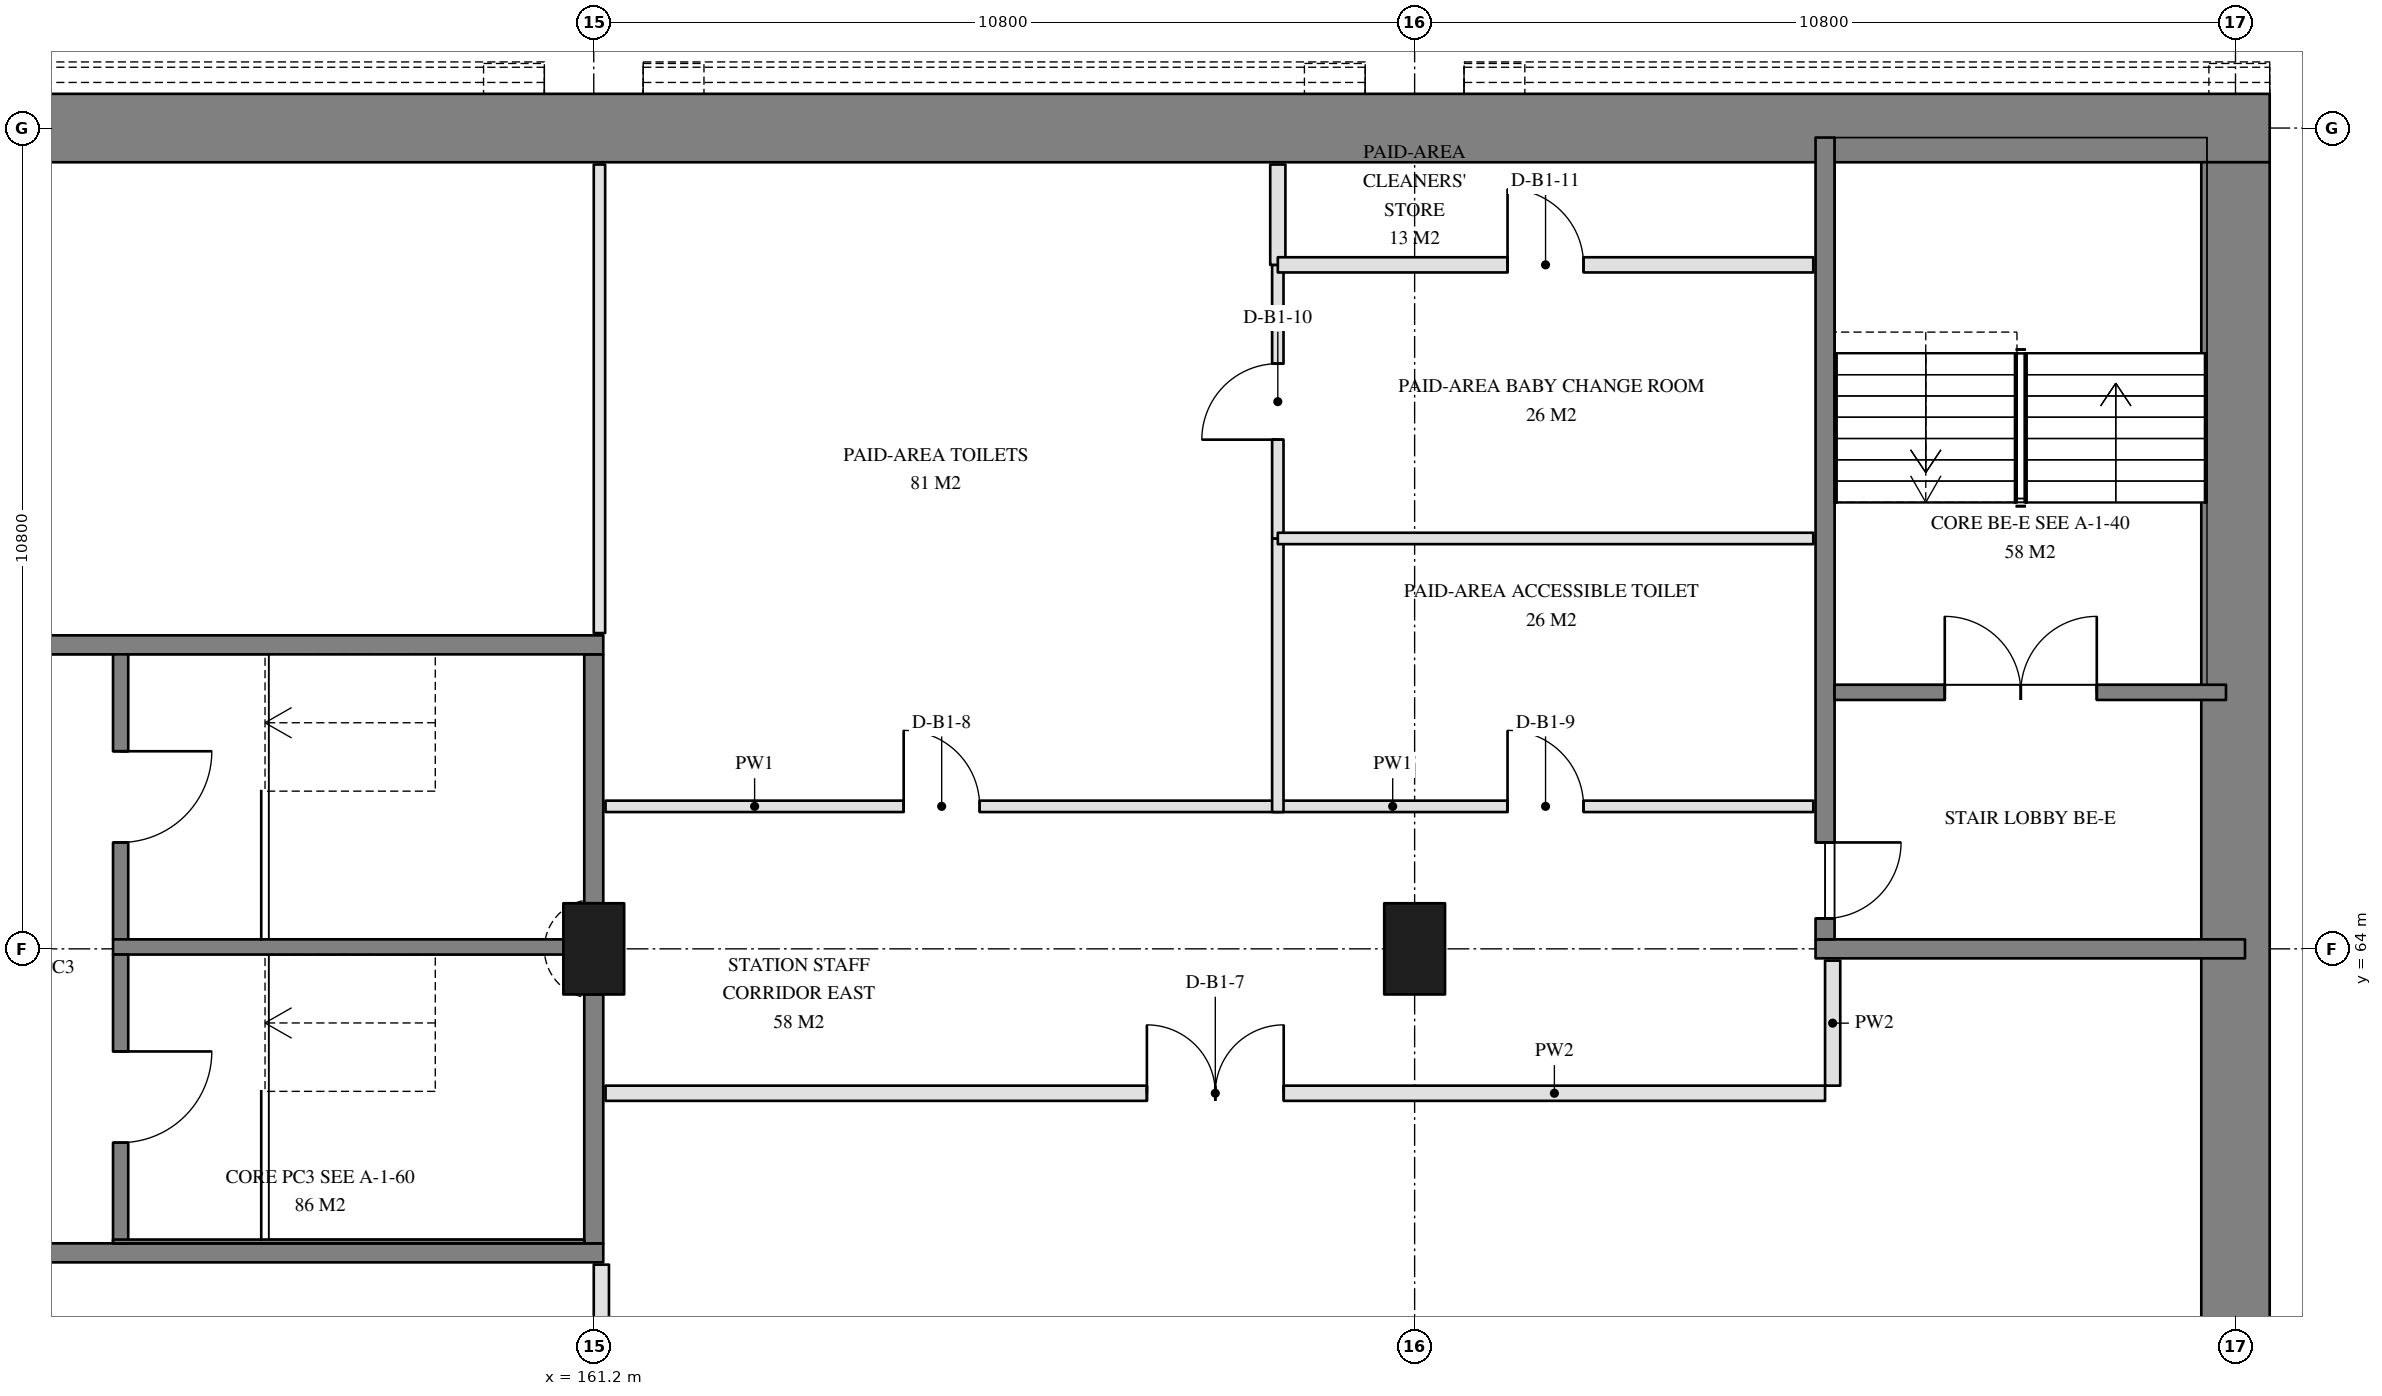
"""IFC4 building model, lengths in metres.
Left out: names, types, materials, properties, quantities, classifications, styles, units other than length and angle.
Written with IfcOpenShell. Run it as: python <this file> out.ifc"""

import sys

from ifc_helpers import new_model, si_unit, direction, frame, frame_2d, origin, origin_2d, place, context, subcontext, project, spatial, rectangle, extrude, element, fill, save


model = new_model("IFC4")
c1 = context("Model", 3, precision=1e-05, world=origin(), true_north=direction((0.0, 1.0)))
c2 = subcontext(c1, "Body", "Model", "MODEL_VIEW")
j1 = project(units=[si_unit("LENGTHUNIT", "METRE"), si_unit("PLANEANGLEUNIT", "RADIAN")], contexts=[c1])
p1 = place(None, origin())
s1 = spatial("IfcSite", under=j1, at=p1, CompositionType="ELEMENT")
p2 = place(p1, origin())
s2 = spatial("IfcBuilding", under=s1, at=p2, CompositionType="ELEMENT")
p3 = place(p2, frame((0.0, 0.0, -5.4)))
s3 = spatial("IfcBuildingStorey", under=s2, at=p3, CompositionType="ELEMENT", Elevation=-5.4)
for number, where, z_axis, x_axis in (
    (1, (161.2, 64.0, 0.0), (0.0, 0.0, 1.0), (1.0, 0.0, 0.0)),
    (2, (172.0, 64.0, 0.0), (0.0, 0.0, 1.0), (1.0, 0.0, 0.0)),
):
    element("IfcColumn", number, at=place(p3, frame(where, z_axis=z_axis, x_axis=x_axis)), inside=s3, PredefinedType="COLUMN", context=c2, shape_type="SweptSolid", body=[
        extrude(rectangle(XDim=0.8, YDim=1.2, at=origin_2d()), origin(), (0.0, 0.0, 1.0), 5.4),
    ])
p4 = place(p3, frame((183.25, 74.8, 0.0), z_axis=(0.0, 0.0, 1.0), x_axis=(-1.0, 0.0, 0.0)))
e3 = element("IfcWall", 3, at=p4, inside=s3, PredefinedType="SOLIDWALL", context=c2, shape_type="SweptSolid", body=[
    extrude(rectangle(XDim=64.85, YDim=0.9, at=frame_2d((32.425, 0.0))), origin(), (0.0, 0.0, 1.0), 4.8),
])
p5 = place(p3, frame((182.8, 53.7, 0.0), z_axis=(0.0, 0.0, 1.0), x_axis=(0.0, 1.0, 0.0)))
e4 = element("IfcWall", 4, at=p5, inside=s3, PredefinedType="SOLIDWALL", context=c2, shape_type="SweptSolid", body=[
    extrude(rectangle(XDim=20.65, YDim=0.9, at=frame_2d((10.325, 0.0))), origin(), (0.0, 0.0, 1.0), 4.8),
])
p6 = place(p3, frame((150.275, 60.0, 0.0), z_axis=(0.0, 0.0, 1.0), x_axis=(1.0, 0.0, 0.0)))
e5 = element("IfcWall", 5, at=p6, inside=s3, PredefinedType="SOLIDWALL", context=c2, shape_type="SweptSolid", body=[
    extrude(rectangle(XDim=11.05, YDim=0.25, at=frame_2d((5.525, 0.0))), origin(), (0.0, 0.0, 1.0), 4.8),
])
p7 = place(p6, frame((1.525, 0.0, 0.0)))
e6 = element("IfcOpeningElement", 6, at=p7, cuts=e5, PredefinedType="OPENING", context=c2, shape_type="SweptSolid", body=[
    extrude(rectangle(XDim=1.8, YDim=2.1, at=frame_2d((0.9, 1.05))), frame((0.0, 0.135, 0.0), z_axis=(0.0, -1.0, 0.0), x_axis=(1.0, 0.0, 0.0)), (0.0, 0.0, 1.0), 0.27),
])
for number, where, z_axis, x_axis in (
    (7, (161.2, 60.125, 0.0), (0.0, 0.0, 1.0), (0.0, 1.0, 0.0)),
    (8, (161.2, 64.6, 0.0), (0.0, 0.0, 1.0), (0.0, 1.0, 0.0)),
):
    element("IfcWall", number, at=place(p3, frame(where, z_axis=z_axis, x_axis=x_axis)), inside=s3, PredefinedType="SOLIDWALL", context=c2, shape_type="SweptSolid", body=[
        extrude(rectangle(XDim=3.275, YDim=0.25, at=frame_2d((1.637, 0.0))), origin(), (0.0, 0.0, 1.0), 4.8),
    ])
p8 = place(p3, frame((161.325, 68.0, 0.0), z_axis=(0.0, 0.0, 1.0), x_axis=(-1.0, 0.0, 0.0)))
e9 = element("IfcWall", 9, at=p8, inside=s3, PredefinedType="SOLIDWALL", context=c2, shape_type="SweptSolid", body=[
    extrude(rectangle(XDim=11.05, YDim=0.25, at=frame_2d((5.525, 0.0))), origin(), (0.0, 0.0, 1.0), 4.8),
])
p9 = place(p3, frame((177.275, 64.0, 0.0), z_axis=(0.0, 0.0, 1.0), x_axis=(1.0, 0.0, 0.0)))
e10 = element("IfcWall", 10, at=p9, inside=s3, PredefinedType="SOLIDWALL", context=c2, shape_type="SweptSolid", body=[
    extrude(rectangle(XDim=5.65, YDim=0.25, at=frame_2d((2.825, 0.0))), origin(), (0.0, 0.0, 1.0), 5.4),
])
p10 = place(p3, frame((177.4, 74.675, 0.0), z_axis=(0.0, 0.0, 1.0), x_axis=(0.0, -1.0, 0.0)))
e11 = element("IfcWall", 11, at=p10, inside=s3, PredefinedType="SOLIDWALL", context=c2, shape_type="SweptSolid", body=[
    extrude(rectangle(XDim=10.55, YDim=0.25, at=frame_2d((5.275, 0.0))), origin(), (0.0, 0.0, 1.0), 5.4),
])
p11 = place(p10, frame((9.275, 0.0, 0.0)))
e12 = element("IfcOpeningElement", 12, at=p11, cuts=e11, PredefinedType="OPENING", context=c2, shape_type="SweptSolid", body=[
    extrude(rectangle(XDim=1.0, YDim=2.1, at=frame_2d((0.5, 1.05))), frame((0.0, 0.135, 0.0), z_axis=(0.0, -1.0, 0.0), x_axis=(1.0, 0.0, 0.0)), (0.0, 0.0, 1.0), 0.27),
])
p12 = place(p3, frame((154.975, 67.875, 0.0), z_axis=(0.0, 0.0, 1.0), x_axis=(0.0, -1.0, 0.0)))
e13 = element("IfcWall", 13, at=p12, inside=s3, PredefinedType="SOLIDWALL", context=c2, shape_type="SweptSolid", body=[
    extrude(rectangle(XDim=3.75, YDim=0.2, at=frame_2d((1.875, 0.0))), origin(), (0.0, 0.0, 1.0), 3.6),
])
p13 = place(p12, frame((1.275, 0.0, 0.0)))
e14 = element("IfcOpeningElement", 14, at=p13, cuts=e13, PredefinedType="OPENING", context=c2, shape_type="SweptSolid", body=[
    extrude(rectangle(XDim=1.2, YDim=2.1, at=frame_2d((0.6, 1.05))), frame((0.0, 0.11, 0.0), z_axis=(0.0, -1.0, 0.0), x_axis=(1.0, 0.0, 0.0)), (0.0, 0.0, 1.0), 0.22),
])
p14 = place(p3, frame((154.875, 64.025, 0.0), z_axis=(0.0, 0.0, 1.0), x_axis=(1.0, 0.0, 0.0)))
e15 = element("IfcWall", 15, at=p14, inside=s3, PredefinedType="SOLIDWALL", context=c2, shape_type="SweptSolid", body=[
    extrude(rectangle(XDim=6.2, YDim=0.2, at=frame_2d((3.1, 0.0))), origin(), (0.0, 0.0, 1.0), 3.6),
])
p15 = place(p3, frame((154.975, 63.925, 0.0), z_axis=(0.0, 0.0, 1.0), x_axis=(0.0, -1.0, 0.0)))
e16 = element("IfcWall", 16, at=p15, inside=s3, PredefinedType="SOLIDWALL", context=c2, shape_type="SweptSolid", body=[
    extrude(rectangle(XDim=3.8, YDim=0.2, at=frame_2d((1.9, 0.0))), origin(), (0.0, 0.0, 1.0), 3.6),
])
p16 = place(p15, frame((1.275, 0.0, 0.0)))
e17 = element("IfcOpeningElement", 17, at=p16, cuts=e16, PredefinedType="OPENING", context=c2, shape_type="SweptSolid", body=[
    extrude(rectangle(XDim=1.2, YDim=2.1, at=frame_2d((0.6, 1.05))), frame((0.0, 0.11, 0.0), z_axis=(0.0, -1.0, 0.0), x_axis=(1.0, 0.0, 0.0)), (0.0, 0.0, 1.0), 0.22),
])
p17 = place(p3, frame((154.875, 60.15, 0.0), z_axis=(0.0, 0.0, 1.0), x_axis=(1.0, 0.0, 0.0)))
e18 = element("IfcWall", 18, at=p17, inside=s3, PredefinedType="SOLIDWALL", context=c2, shape_type="SweptSolid", body=[
    extrude(rectangle(XDim=6.2, YDim=0.05, at=frame_2d((3.1, 0.0))), origin(), (0.0, 0.0, 1.0), 3.6),
])
p18 = place(p3, frame((177.525, 67.375, 0.0), z_axis=(0.0, 0.0, 1.0), x_axis=(1.0, 0.0, 0.0)))
e19 = element("IfcWall", 19, at=p18, inside=s3, PredefinedType="SOLIDWALL", context=c2, shape_type="SweptSolid", body=[
    extrude(rectangle(XDim=5.15, YDim=0.2, at=frame_2d((2.575, 0.0))), origin(), (0.0, 0.0, 1.0), 4.8),
])
p19 = place(p18, frame((1.45, 0.0, 0.0)))
e20 = element("IfcOpeningElement", 20, at=p19, cuts=e19, PredefinedType="OPENING", context=c2, shape_type="SweptSolid", body=[
    extrude(rectangle(XDim=2.0, YDim=2.1, at=frame_2d((1.0, 1.05))), frame((0.0, 0.11, 0.0), z_axis=(0.0, -1.0, 0.0), x_axis=(1.0, 0.0, 0.0)), (0.0, 0.0, 1.0), 0.22),
])
p20 = place(p3, frame((177.5, 62.2, 0.0), z_axis=(0.0, 0.0, 1.0), x_axis=(0.0, 1.0, 0.0)))
e21 = element("IfcWall", 21, at=p20, inside=s3, PredefinedType="PARTITIONING", context=c2, shape_type="SweptSolid", body=[
    extrude(rectangle(XDim=1.645, YDim=0.2, at=frame_2d((0.823, 0.0))), origin(), (0.0, 0.0, 1.0), 4.8),
])
p21 = place(p3, frame((161.355, 62.1, 0.0), z_axis=(0.0, 0.0, 1.0), x_axis=(1.0, 0.0, 0.0)))
e22 = element("IfcWall", 22, at=p21, inside=s3, PredefinedType="PARTITIONING", context=c2, shape_type="SweptSolid", body=[
    extrude(rectangle(XDim=16.045, YDim=0.2, at=frame_2d((8.022, 0.0))), origin(), (0.0, 0.0, 1.0), 3.6),
])
p22 = place(p21, frame((7.123, 0.0, 0.0)))
e23 = element("IfcOpeningElement", 23, at=p22, cuts=e22, PredefinedType="OPENING", context=c2, shape_type="SweptSolid", body=[
    extrude(rectangle(XDim=1.8, YDim=2.1, at=frame_2d((0.9, 1.05))), frame((0.0, 0.11, 0.0), z_axis=(0.0, -1.0, 0.0), x_axis=(1.0, 0.0, 0.0)), (0.0, 0.0, 1.0), 0.22),
])
p23 = place(p3, frame((170.2, 65.875, 0.0), z_axis=(0.0, 0.0, 1.0), x_axis=(1.0, 0.0, 0.0)))
e24 = element("IfcWall", 24, at=p23, inside=s3, PredefinedType="PARTITIONING", context=c2, shape_type="SweptSolid", body=[
    extrude(rectangle(XDim=7.045, YDim=0.15, at=frame_2d((3.522, 0.0))), origin(), (0.0, 0.0, 1.0), 3.6),
])
p24 = place(p23, frame((3.022, 0.0, 0.0)))
e25 = element("IfcOpeningElement", 25, at=p24, cuts=e24, PredefinedType="OPENING", context=c2, shape_type="SweptSolid", body=[
    extrude(rectangle(XDim=1.0, YDim=2.1, at=frame_2d((0.5, 1.05))), frame((0.0, 0.085, 0.0), z_axis=(0.0, -1.0, 0.0), x_axis=(1.0, 0.0, 0.0)), (0.0, 0.0, 1.0), 0.17),
])
p25 = place(p3, frame((161.355, 65.875, 0.0), z_axis=(0.0, 0.0, 1.0), x_axis=(1.0, 0.0, 0.0)))
e26 = element("IfcWall", 26, at=p25, inside=s3, PredefinedType="PARTITIONING", context=c2, shape_type="SweptSolid", body=[
    extrude(rectangle(XDim=8.845, YDim=0.15, at=frame_2d((4.422, 0.0))), origin(), (0.0, 0.0, 1.0), 3.6),
])
p26 = place(p25, frame((3.923, 0.0, 0.0)))
e27 = element("IfcOpeningElement", 27, at=p26, cuts=e26, PredefinedType="OPENING", context=c2, shape_type="SweptSolid", body=[
    extrude(rectangle(XDim=1.0, YDim=2.1, at=frame_2d((0.5, 1.05))), frame((0.0, 0.085, 0.0), z_axis=(0.0, -1.0, 0.0), x_axis=(1.0, 0.0, 0.0)), (0.0, 0.0, 1.0), 0.17),
])
p27 = place(p3, frame((161.3, 53.72, 0.0), z_axis=(0.0, 0.0, 1.0), x_axis=(0.0, 1.0, 0.0)))
e28 = element("IfcWall", 28, at=p27, inside=s3, PredefinedType="PARTITIONING", context=c2, shape_type="SweptSolid", body=[
    extrude(rectangle(XDim=6.125, YDim=0.2, at=frame_2d((3.062, 0.0))), origin(), (0.0, 0.0, 1.0), 3.6),
])
p28 = place(p3, frame((170.2, 65.8, 0.0), z_axis=(0.0, 0.0, 1.0), x_axis=(0.0, 1.0, 0.0)))
e29 = element("IfcWall", 29, at=p28, inside=s3, PredefinedType="PARTITIONING", context=c2, shape_type="SweptSolid", body=[
    extrude(rectangle(XDim=3.6, YDim=0.15, at=frame_2d((1.8, 0.0))), origin(), (0.0, 0.0, 1.0), 4.8),
])
p29 = place(p3, frame((161.275, 68.155, 0.0), z_axis=(0.0, 0.0, 1.0), x_axis=(0.0, 1.0, 0.0)))
e30 = element("IfcWall", 30, at=p29, inside=s3, PredefinedType="PARTITIONING", context=c2, shape_type="SweptSolid", body=[
    extrude(rectangle(XDim=6.165, YDim=0.15, at=frame_2d((3.083, 0.0))), origin(), (0.0, 0.0, 1.0), 3.6),
])
p30 = place(p3, frame((170.2, 69.4, 0.0), z_axis=(0.0, 0.0, 1.0), x_axis=(0.0, 1.0, 0.0)))
e31 = element("IfcWall", 31, at=p30, inside=s3, PredefinedType="PARTITIONING", context=c2, shape_type="SweptSolid", body=[
    extrude(rectangle(XDim=3.6, YDim=0.15, at=frame_2d((1.8, 0.0))), origin(), (0.0, 0.0, 1.0), 4.8),
])
p31 = place(p30, frame((1.3, 0.0, 0.0)))
e32 = element("IfcOpeningElement", 32, at=p31, cuts=e31, PredefinedType="OPENING", context=c2, shape_type="SweptSolid", body=[
    extrude(rectangle(XDim=1.0, YDim=2.1, at=frame_2d((0.5, 1.05))), frame((0.0, 0.085, 0.0), z_axis=(0.0, -1.0, 0.0), x_axis=(1.0, 0.0, 0.0)), (0.0, 0.0, 1.0), 0.17),
])
p32 = place(p3, frame((170.2, 73.0, 0.0), z_axis=(0.0, 0.0, 1.0), x_axis=(0.0, 1.0, 0.0)))
e33 = element("IfcWall", 33, at=p32, inside=s3, PredefinedType="PARTITIONING", context=c2, shape_type="SweptSolid", body=[
    extrude(rectangle(XDim=1.32, YDim=0.2, at=frame_2d((0.66, 0.0))), origin(), (0.0, 0.0, 1.0), 4.8),
])
p33 = place(p3, frame((170.2, 69.4, 0.0), z_axis=(0.0, 0.0, 1.0), x_axis=(1.0, 0.0, 0.0)))
e34 = element("IfcWall", 34, at=p33, inside=s3, PredefinedType="PARTITIONING", context=c2, shape_type="SweptSolid", body=[
    extrude(rectangle(XDim=7.045, YDim=0.15, at=frame_2d((3.522, 0.0))), origin(), (0.0, 0.0, 1.0), 3.6),
])
p34 = place(p3, frame((170.2, 73.0, 0.0), z_axis=(0.0, 0.0, 1.0), x_axis=(1.0, 0.0, 0.0)))
e35 = element("IfcWall", 35, at=p34, inside=s3, PredefinedType="PARTITIONING", context=c2, shape_type="SweptSolid", body=[
    extrude(rectangle(XDim=7.045, YDim=0.2, at=frame_2d((3.522, 0.0))), origin(), (0.0, 0.0, 1.0), 3.6),
])
p35 = place(p34, frame((3.022, 0.0, 0.0)))
e36 = element("IfcOpeningElement", 36, at=p35, cuts=e35, PredefinedType="OPENING", context=c2, shape_type="SweptSolid", body=[
    extrude(rectangle(XDim=1.0, YDim=2.1, at=frame_2d((0.5, 1.05))), frame((0.0, 0.11, 0.0), z_axis=(0.0, -1.0, 0.0), x_axis=(1.0, 0.0, 0.0)), (0.0, 0.0, 1.0), 0.22),
])
p36 = place(p13, frame((1.2, 0.0, 0.0), z_axis=(0.0, 0.0, 1.0), x_axis=(-1.0, 0.0, 0.0)))
e37 = element("IfcDoor", 37, at=p36, inside=s3, OperationType="SINGLE_SWING_RIGHT", PredefinedType="DOOR", context=c2, shape_type="SweptSolid", body=[
    extrude(rectangle(XDim=1.2, YDim=2.1, at=frame_2d((0.6, 1.05))), frame((0.0, 0.025, 0.0), z_axis=(0.0, -1.0, 0.0), x_axis=(1.0, 0.0, 0.0)), (0.0, 0.0, 1.0), 0.05),
])
fill(e14, e37)
p37 = place(p16, frame((1.2, 0.0, 0.0), z_axis=(0.0, 0.0, 1.0), x_axis=(-1.0, 0.0, 0.0)))
e38 = element("IfcDoor", 38, at=p37, inside=s3, OperationType="SINGLE_SWING_RIGHT", PredefinedType="DOOR", context=c2, shape_type="SweptSolid", body=[
    extrude(rectangle(XDim=1.2, YDim=2.1, at=frame_2d((0.6, 1.05))), frame((0.0, 0.025, 0.0), z_axis=(0.0, -1.0, 0.0), x_axis=(1.0, 0.0, 0.0)), (0.0, 0.0, 1.0), 0.05),
])
fill(e17, e38)
p38 = place(p19, frame((2.0, 0.0, 0.0), z_axis=(0.0, 0.0, 1.0), x_axis=(-1.0, 0.0, 0.0)))
e39 = element("IfcDoor", 39, at=p38, inside=s3, OperationType="DOUBLE_DOOR_DOUBLE_SWING", PredefinedType="DOOR", context=c2, shape_type="SweptSolid", body=[
    extrude(rectangle(XDim=2.0, YDim=2.1, at=frame_2d((1.0, 1.05))), frame((0.0, 0.025, 0.0), z_axis=(0.0, -1.0, 0.0), x_axis=(1.0, 0.0, 0.0)), (0.0, 0.0, 1.0), 0.05),
])
fill(e20, e39)
p39 = place(p11, frame((1.0, 0.0, 0.0), z_axis=(0.0, 0.0, 1.0), x_axis=(-1.0, 0.0, 0.0)))
e40 = element("IfcDoor", 40, at=p39, inside=s3, OperationType="SINGLE_SWING_LEFT", PredefinedType="DOOR", context=c2, shape_type="SweptSolid", body=[
    extrude(rectangle(XDim=1.0, YDim=2.1, at=frame_2d((0.5, 1.05))), frame((0.0, 0.025, 0.0), z_axis=(0.0, -1.0, 0.0), x_axis=(1.0, 0.0, 0.0)), (0.0, 0.0, 1.0), 0.05),
])
fill(e12, e40)
p40 = place(p22, frame((1.8, 0.0, 0.0), z_axis=(0.0, 0.0, 1.0), x_axis=(-1.0, 0.0, 0.0)))
e41 = element("IfcDoor", 41, at=p40, inside=s3, OperationType="DOUBLE_DOOR_DOUBLE_SWING", PredefinedType="DOOR", context=c2, shape_type="SweptSolid", body=[
    extrude(rectangle(XDim=1.8, YDim=2.1, at=frame_2d((0.9, 1.05))), frame((0.0, 0.025, 0.0), z_axis=(0.0, -1.0, 0.0), x_axis=(1.0, 0.0, 0.0)), (0.0, 0.0, 1.0), 0.05),
])
fill(e23, e41)
p41 = place(p26, origin())
e42 = element("IfcDoor", 42, at=p41, inside=s3, OperationType="SINGLE_SWING_LEFT", PredefinedType="DOOR", context=c2, shape_type="SweptSolid", body=[
    extrude(rectangle(XDim=1.0, YDim=2.1, at=frame_2d((0.5, 1.05))), frame((0.0, 0.025, 0.0), z_axis=(0.0, -1.0, 0.0), x_axis=(1.0, 0.0, 0.0)), (0.0, 0.0, 1.0), 0.05),
])
fill(e27, e42)
p42 = place(p24, origin())
e43 = element("IfcDoor", 43, at=p42, inside=s3, OperationType="SINGLE_SWING_LEFT", PredefinedType="DOOR", context=c2, shape_type="SweptSolid", body=[
    extrude(rectangle(XDim=1.0, YDim=2.1, at=frame_2d((0.5, 1.05))), frame((0.0, 0.025, 0.0), z_axis=(0.0, -1.0, 0.0), x_axis=(1.0, 0.0, 0.0)), (0.0, 0.0, 1.0), 0.05),
])
fill(e25, e43)
p43 = place(p31, frame((1.0, 0.0, 0.0), z_axis=(0.0, 0.0, 1.0), x_axis=(-1.0, 0.0, 0.0)))
e44 = element("IfcDoor", 44, at=p43, inside=s3, OperationType="SINGLE_SWING_RIGHT", PredefinedType="DOOR", context=c2, shape_type="SweptSolid", body=[
    extrude(rectangle(XDim=1.0, YDim=2.1, at=frame_2d((0.5, 1.05))), frame((0.0, 0.025, 0.0), z_axis=(0.0, -1.0, 0.0), x_axis=(1.0, 0.0, 0.0)), (0.0, 0.0, 1.0), 0.05),
])
fill(e32, e44)
p44 = place(p35, origin())
e45 = element("IfcDoor", 45, at=p44, inside=s3, OperationType="SINGLE_SWING_LEFT", PredefinedType="DOOR", context=c2, shape_type="SweptSolid", body=[
    extrude(rectangle(XDim=1.0, YDim=2.1, at=frame_2d((0.5, 1.05))), frame((0.0, 0.025, 0.0), z_axis=(0.0, -1.0, 0.0), x_axis=(1.0, 0.0, 0.0)), (0.0, 0.0, 1.0), 0.05),
])
fill(e36, e45)
save(model, sys.argv[1])
